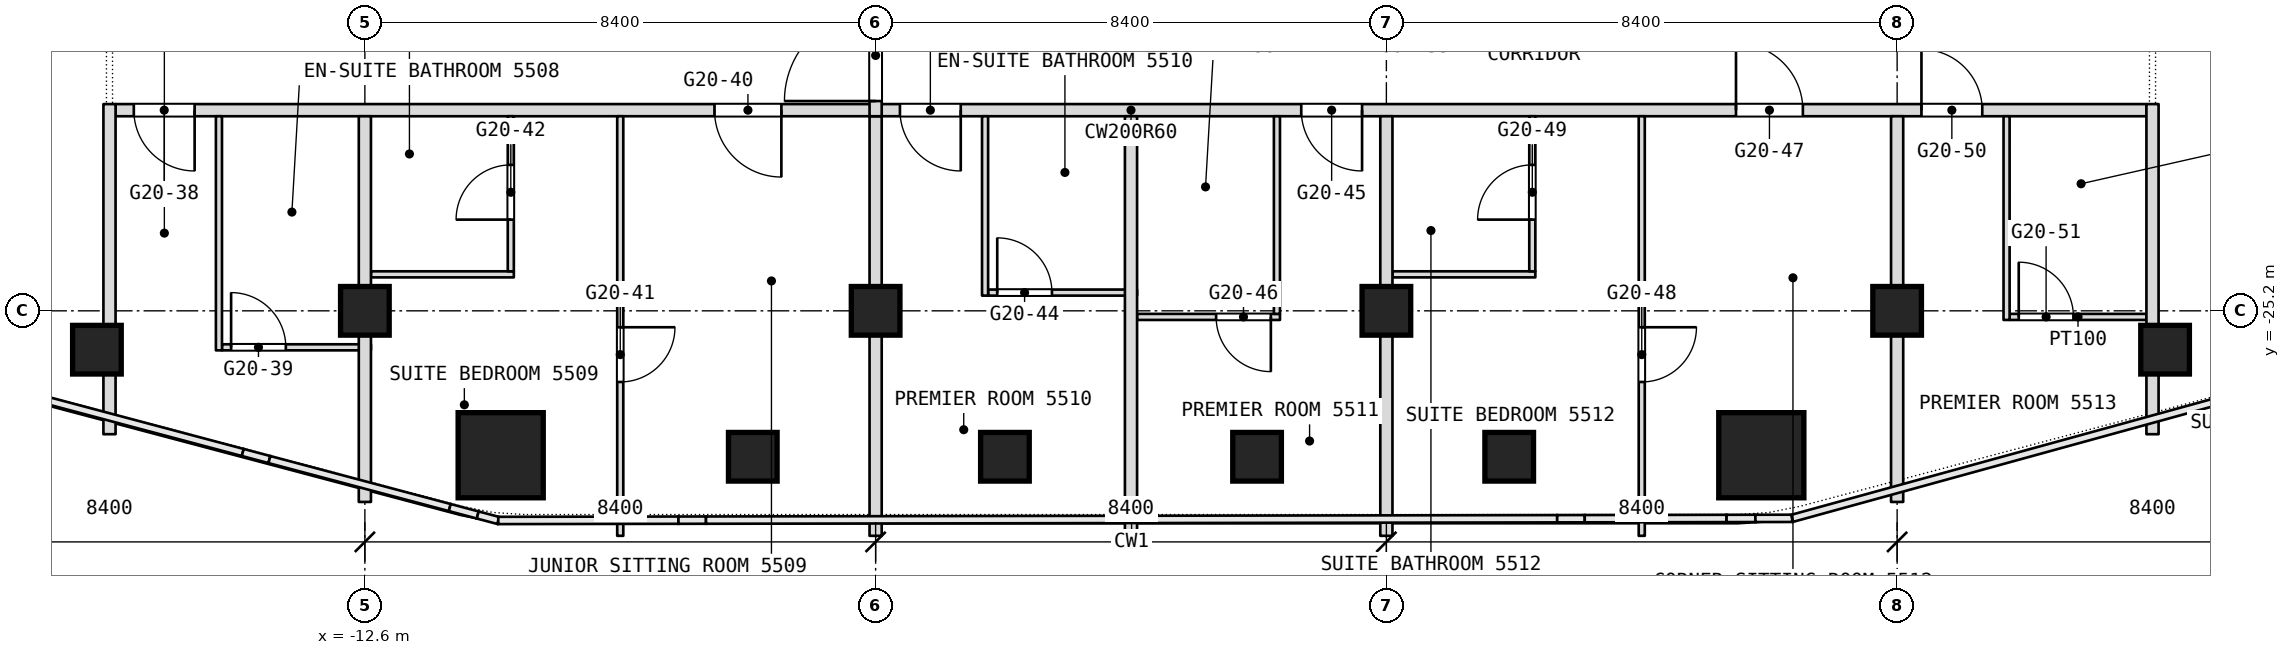
"""IFC4 building model, lengths in metres.
Left out: names, types, materials, properties, quantities, classifications, styles, units other than length and angle.
Written with IfcOpenShell. Run it as: python <this file> out.ifc"""

import sys

from ifc_helpers import new_model, si_unit, direction, frame, frame_2d, origin, origin_2d, place, context, subcontext, project, spatial, rectangle, extrude, element, fill, save


model = new_model("IFC4")
c1 = context("Model", 3, precision=1e-05, world=origin(), true_north=direction((0.0, 1.0)))
c2 = subcontext(c1, "Body", "Model", "MODEL_VIEW")
j1 = project(units=[si_unit("LENGTHUNIT", "METRE"), si_unit("PLANEANGLEUNIT", "RADIAN")], contexts=[c1])
p1 = place(None, origin())
s1 = spatial("IfcSite", under=j1, at=p1, CompositionType="ELEMENT")
p2 = place(p1, origin())
s2 = spatial("IfcBuilding", under=s1, at=p2, CompositionType="ELEMENT")
p3 = place(p2, frame((0.0, 0.0, 234.5)))
s3 = spatial("IfcBuildingStorey", under=s2, at=p3, CompositionType="ELEMENT", Elevation=234.5)
for number, where, z_axis, x_axis in (
    (1, (-10.366, -27.575, 0.0), (0.0, 0.0, 1.0), (1.0, 0.0, 0.0)),
    (2, (10.366, -27.575, 0.0), (0.0, 0.0, 1.0), (1.0, 0.0, 0.0)),
):
    element("IfcColumn", number, at=place(p3, frame(where, z_axis=z_axis, x_axis=x_axis)), inside=s3, PredefinedType="COLUMN", context=c2, shape_type="SweptSolid", body=[
        extrude(rectangle(XDim=1.4, YDim=1.4, at=origin_2d()), origin(), (0.0, 0.0, 1.0), 3.6),
    ])
for number, where, z_axis, x_axis in (
    (3, (-12.6, -25.2, 0.0), (0.0, 0.0, 1.0), (1.0, 0.0, 0.0)),
    (4, (-4.2, -25.2, 0.0), (0.0, 0.0, 1.0), (1.0, 0.0, 0.0)),
    (5, (4.2, -25.2, 0.0), (0.0, 0.0, 1.0), (1.0, 0.0, 0.0)),
    (6, (12.6, -25.2, 0.0), (0.0, 0.0, 1.0), (1.0, 0.0, 0.0)),
    (7, (17.007, -25.839, 0.0), (0.0, 0.0, 1.0), (1.0, 0.0, 0.0)),
    (8, (6.22, -27.6, 0.0), (0.0, 0.0, 1.0), (1.0, 0.0, 0.0)),
    (9, (2.073, -27.6, 0.0), (0.0, 0.0, 1.0), (1.0, 0.0, 0.0)),
    (10, (-2.073, -27.6, 0.0), (0.0, 0.0, 1.0), (1.0, 0.0, 0.0)),
    (11, (-6.22, -27.6, 0.0), (0.0, 0.0, 1.0), (1.0, 0.0, 0.0)),
    (12, (-17.007, -25.839, 0.0), (0.0, 0.0, 1.0), (1.0, 0.0, 0.0)),
):
    element("IfcColumn", number, at=place(p3, frame(where, z_axis=z_axis, x_axis=x_axis)), inside=s3, PredefinedType="COLUMN", context=c2, shape_type="SweptSolid", body=[
        extrude(rectangle(XDim=0.8, YDim=0.8, at=origin_2d()), origin(), (0.0, 0.0, 1.0), 3.6),
    ])
p4 = place(p3, frame((-14.95, -25.8, 0.0), z_axis=(0.0, 0.0, 1.0), x_axis=(1.0, 0.0, 0.0)))
e13 = element("IfcWall", 13, at=p4, inside=s3, PredefinedType="PARTITIONING", context=c2, shape_type="SweptSolid", body=[
    extrude(rectangle(XDim=2.45, YDim=0.1, at=frame_2d((1.225, 0.0))), origin(), (0.0, 0.0, 1.0), 3.34),
])
p5 = place(p4, frame((0.15, 0.0, 0.0)))
e14 = element("IfcOpeningElement", 14, at=p5, cuts=e13, PredefinedType="OPENING", context=c2, shape_type="SweptSolid", body=[
    extrude(rectangle(XDim=0.9, YDim=2.1, at=frame_2d((0.45, 1.05))), frame((0.0, 0.05, 0.0), z_axis=(0.0, -1.0, 0.0), x_axis=(1.0, 0.0, 0.0)), (0.0, 0.0, 1.0), 0.1),
])
p6 = place(p3, frame((0.1, -25.3, 0.0), z_axis=(0.0, 0.0, 1.0), x_axis=(1.0, 0.0, 0.0)))
e15 = element("IfcWall", 15, at=p6, inside=s3, PredefinedType="PARTITIONING", context=c2, shape_type="SweptSolid", body=[
    extrude(rectangle(XDim=2.35, YDim=0.1, at=frame_2d((1.175, 0.0))), origin(), (0.0, 0.0, 1.0), 2.94),
])
p7 = place(p6, frame((1.3, 0.0, 0.0)))
e16 = element("IfcOpeningElement", 16, at=p7, cuts=e15, PredefinedType="OPENING", context=c2, shape_type="SweptSolid", body=[
    extrude(rectangle(XDim=0.9, YDim=2.1, at=frame_2d((0.45, 1.05))), frame((0.0, 0.05, 0.0), z_axis=(0.0, -1.0, 0.0), x_axis=(1.0, 0.0, 0.0)), (0.0, 0.0, 1.0), 0.1),
])
p8 = place(p3, frame((14.45, -25.3, 0.0), z_axis=(0.0, 0.0, 1.0), x_axis=(1.0, 0.0, 0.0)))
e17 = element("IfcWall", 17, at=p8, inside=s3, PredefinedType="PARTITIONING", context=c2, shape_type="SweptSolid", body=[
    extrude(rectangle(XDim=2.25, YDim=0.1, at=frame_2d((1.125, 0.0))), origin(), (0.0, 0.0, 1.0), 2.94),
])
p9 = place(p8, frame((0.15, 0.0, 0.0)))
e18 = element("IfcOpeningElement", 18, at=p9, cuts=e17, PredefinedType="OPENING", context=c2, shape_type="SweptSolid", body=[
    extrude(rectangle(XDim=0.9, YDim=2.1, at=frame_2d((0.45, 1.05))), frame((0.0, 0.05, 0.0), z_axis=(0.0, -1.0, 0.0), x_axis=(1.0, 0.0, 0.0)), (0.0, 0.0, 1.0), 0.1),
])
p10 = place(p3, frame((-2.35, -24.9, 0.0), z_axis=(0.0, 0.0, 1.0), x_axis=(1.0, 0.0, 0.0)))
e19 = element("IfcWall", 19, at=p10, inside=s3, PredefinedType="PARTITIONING", context=c2, shape_type="SweptSolid", body=[
    extrude(rectangle(XDim=2.45, YDim=0.1, at=frame_2d((1.225, 0.0))), origin(), (0.0, 0.0, 1.0), 3.34),
])
p11 = place(p10, frame((0.15, 0.0, 0.0)))
e20 = element("IfcOpeningElement", 20, at=p11, cuts=e19, PredefinedType="OPENING", context=c2, shape_type="SweptSolid", body=[
    extrude(rectangle(XDim=0.9, YDim=2.1, at=frame_2d((0.45, 1.05))), frame((0.0, 0.05, 0.0), z_axis=(0.0, -1.0, 0.0), x_axis=(1.0, 0.0, 0.0)), (0.0, 0.0, 1.0), 0.1),
])
p12 = place(p3, frame((-12.5, -24.6, 0.0), z_axis=(0.0, 0.0, 1.0), x_axis=(1.0, 0.0, 0.0)))
e21 = element("IfcWall", 21, at=p12, inside=s3, PredefinedType="PARTITIONING", context=c2, shape_type="SweptSolid", body=[
    extrude(rectangle(XDim=2.35, YDim=0.1, at=frame_2d((1.175, 0.0))), origin(), (0.0, 0.0, 1.0), 3.34),
])
p13 = place(p3, frame((4.3, -24.6, 0.0), z_axis=(0.0, 0.0, 1.0), x_axis=(1.0, 0.0, 0.0)))
e22 = element("IfcWall", 22, at=p13, inside=s3, PredefinedType="PARTITIONING", context=c2, shape_type="SweptSolid", body=[
    extrude(rectangle(XDim=2.35, YDim=0.1, at=frame_2d((1.175, 0.0))), origin(), (0.0, 0.0, 1.0), 3.34),
])
p14 = place(p3, frame((-16.7, -21.9, 0.0), z_axis=(0.0, 0.0, 1.0), x_axis=(1.0, 0.0, 0.0)))
e23 = element("IfcWall", 23, at=p14, inside=s3, PredefinedType="PARTITIONING", context=c2, shape_type="SweptSolid", body=[
    extrude(rectangle(XDim=33.4, YDim=0.2, at=frame_2d((16.7, 0.0))), origin(), (0.0, 0.0, 1.0), 3.34),
])
p15 = place(p14, frame((0.3, 0.0, 0.0)))
e24 = element("IfcOpeningElement", 24, at=p15, cuts=e23, PredefinedType="OPENING", context=c2, shape_type="SweptSolid", body=[
    extrude(rectangle(XDim=1.0, YDim=2.1, at=frame_2d((0.5, 1.05))), frame((0.0, 0.1, 0.0), z_axis=(0.0, -1.0, 0.0), x_axis=(1.0, 0.0, 0.0)), (0.0, 0.0, 1.0), 0.2),
])
p16 = place(p14, frame((9.85, 0.0, 0.0)))
e25 = element("IfcOpeningElement", 25, at=p16, cuts=e23, PredefinedType="OPENING", context=c2, shape_type="SweptSolid", body=[
    extrude(rectangle(XDim=1.1, YDim=2.1, at=frame_2d((0.55, 1.05))), frame((0.0, 0.1, 0.0), z_axis=(0.0, -1.0, 0.0), x_axis=(1.0, 0.0, 0.0)), (0.0, 0.0, 1.0), 0.2),
])
p17 = place(p14, frame((12.9, 0.0, 0.0)))
e26 = element("IfcOpeningElement", 26, at=p17, cuts=e23, PredefinedType="OPENING", context=c2, shape_type="SweptSolid", body=[
    extrude(rectangle(XDim=1.0, YDim=2.1, at=frame_2d((0.5, 1.05))), frame((0.0, 0.1, 0.0), z_axis=(0.0, -1.0, 0.0), x_axis=(1.0, 0.0, 0.0)), (0.0, 0.0, 1.0), 0.2),
])
p18 = place(p14, frame((19.5, 0.0, 0.0)))
e27 = element("IfcOpeningElement", 27, at=p18, cuts=e23, PredefinedType="OPENING", context=c2, shape_type="SweptSolid", body=[
    extrude(rectangle(XDim=1.0, YDim=2.1, at=frame_2d((0.5, 1.05))), frame((0.0, 0.1, 0.0), z_axis=(0.0, -1.0, 0.0), x_axis=(1.0, 0.0, 0.0)), (0.0, 0.0, 1.0), 0.2),
])
p19 = place(p14, frame((26.65, 0.0, 0.0)))
e28 = element("IfcOpeningElement", 28, at=p19, cuts=e23, PredefinedType="OPENING", context=c2, shape_type="SweptSolid", body=[
    extrude(rectangle(XDim=1.1, YDim=2.1, at=frame_2d((0.55, 1.05))), frame((0.0, 0.1, 0.0), z_axis=(0.0, -1.0, 0.0), x_axis=(1.0, 0.0, 0.0)), (0.0, 0.0, 1.0), 0.2),
])
p20 = place(p14, frame((29.7, 0.0, 0.0)))
e29 = element("IfcOpeningElement", 29, at=p20, cuts=e23, PredefinedType="OPENING", context=c2, shape_type="SweptSolid", body=[
    extrude(rectangle(XDim=1.0, YDim=2.1, at=frame_2d((0.5, 1.05))), frame((0.0, 0.1, 0.0), z_axis=(0.0, -1.0, 0.0), x_axis=(1.0, 0.0, 0.0)), (0.0, 0.0, 1.0), 0.2),
])
p21 = place(p3, frame((16.8, -27.229, 0.0), z_axis=(0.0, 0.0, 1.0), x_axis=(0.0, 1.0, 0.0)))
e30 = element("IfcWall", 30, at=p21, inside=s3, PredefinedType="PARTITIONING", context=c2, shape_type="SweptSolid", body=[
    extrude(rectangle(XDim=5.429, YDim=0.2, at=frame_2d((2.714, 0.0))), origin(), (0.0, 0.0, 1.0), 3.34),
])
p22 = place(p3, frame((14.4, -25.35, 0.0), z_axis=(0.0, 0.0, 1.0), x_axis=(0.0, 1.0, 0.0)))
e31 = element("IfcWall", 31, at=p22, inside=s3, PredefinedType="PARTITIONING", context=c2, shape_type="SweptSolid", body=[
    extrude(rectangle(XDim=3.35, YDim=0.1, at=frame_2d((1.675, 0.0))), origin(), (0.0, 0.0, 1.0), 3.34),
])
p23 = place(p3, frame((12.6, -28.343, 0.0), z_axis=(0.0, 0.0, 1.0), x_axis=(0.0, 1.0, 0.0)))
e32 = element("IfcWall", 32, at=p23, inside=s3, PredefinedType="PARTITIONING", context=c2, shape_type="SweptSolid", body=[
    extrude(rectangle(XDim=6.343, YDim=0.2, at=frame_2d((3.171, 0.0))), origin(), (0.0, 0.0, 1.0), 3.34),
])
p24 = place(p3, frame((8.4, -28.9, 0.0), z_axis=(0.0, 0.0, 1.0), x_axis=(0.0, 1.0, 0.0)))
e33 = element("IfcWall", 33, at=p24, inside=s3, PredefinedType="PARTITIONING", context=c2, shape_type="SweptSolid", body=[
    extrude(rectangle(XDim=6.9, YDim=0.1, at=frame_2d((3.45, 0.0))), origin(), (0.0, 0.0, 1.0), 3.34),
])
p25 = place(p24, frame((2.53, 0.0, 0.0)))
e34 = element("IfcOpeningElement", 34, at=p25, cuts=e33, PredefinedType="OPENING", context=c2, shape_type="SweptSolid", body=[
    extrude(rectangle(XDim=0.9, YDim=2.1, at=frame_2d((0.45, 1.05))), frame((0.0, 0.05, 0.0), z_axis=(0.0, -1.0, 0.0), x_axis=(1.0, 0.0, 0.0)), (0.0, 0.0, 1.0), 0.1),
])
p26 = place(p3, frame((6.6, -24.55, 0.0), z_axis=(0.0, 0.0, 1.0), x_axis=(0.0, 1.0, 0.0)))
e35 = element("IfcWall", 35, at=p26, inside=s3, PredefinedType="PARTITIONING", context=c2, shape_type="SweptSolid", body=[
    extrude(rectangle(XDim=2.55, YDim=0.1, at=frame_2d((1.275, 0.0))), origin(), (0.0, 0.0, 1.0), 3.34),
])
p27 = place(p26, frame((0.85, 0.0, 0.0)))
e36 = element("IfcOpeningElement", 36, at=p27, cuts=e35, PredefinedType="OPENING", context=c2, shape_type="SweptSolid", body=[
    extrude(rectangle(XDim=0.9, YDim=2.1, at=frame_2d((0.45, 1.05))), frame((0.0, 0.05, 0.0), z_axis=(0.0, -1.0, 0.0), x_axis=(1.0, 0.0, 0.0)), (0.0, 0.0, 1.0), 0.1),
])
p28 = place(p3, frame((4.2, -28.9, 0.0), z_axis=(0.0, 0.0, 1.0), x_axis=(0.0, 1.0, 0.0)))
e37 = element("IfcWall", 37, at=p28, inside=s3, PredefinedType="PARTITIONING", context=c2, shape_type="SweptSolid", body=[
    extrude(rectangle(XDim=6.9, YDim=0.2, at=frame_2d((3.45, 0.0))), origin(), (0.0, 0.0, 1.0), 3.34),
])
p29 = place(p3, frame((2.4, -25.25, 0.0), z_axis=(0.0, 0.0, 1.0), x_axis=(0.0, 1.0, 0.0)))
e38 = element("IfcWall", 38, at=p29, inside=s3, PredefinedType="PARTITIONING", context=c2, shape_type="SweptSolid", body=[
    extrude(rectangle(XDim=3.25, YDim=0.1, at=frame_2d((1.625, 0.0))), origin(), (0.0, 0.0, 1.0), 3.34),
])
p30 = place(p3, frame((0.0, -28.9, 0.0), z_axis=(0.0, 0.0, 1.0), x_axis=(0.0, 1.0, 0.0)))
e39 = element("IfcWall", 39, at=p30, inside=s3, PredefinedType="PARTITIONING", context=c2, shape_type="SweptSolid", body=[
    extrude(rectangle(XDim=6.9, YDim=0.2, at=frame_2d((3.45, 0.0))), origin(), (0.0, 0.0, 1.0), 3.34),
])
p31 = place(p3, frame((-2.4, -24.95, 0.0), z_axis=(0.0, 0.0, 1.0), x_axis=(0.0, 1.0, 0.0)))
e40 = element("IfcWall", 40, at=p31, inside=s3, PredefinedType="PARTITIONING", context=c2, shape_type="SweptSolid", body=[
    extrude(rectangle(XDim=2.95, YDim=0.1, at=frame_2d((1.475, 0.0))), origin(), (0.0, 0.0, 1.0), 3.34),
])
p32 = place(p3, frame((-4.2, -28.9, 0.0), z_axis=(0.0, 0.0, 1.0), x_axis=(0.0, 1.0, 0.0)))
e41 = element("IfcWall", 41, at=p32, inside=s3, PredefinedType="PARTITIONING", context=c2, shape_type="SweptSolid", body=[
    extrude(rectangle(XDim=6.9, YDim=0.2, at=frame_2d((3.45, 0.0))), origin(), (0.0, 0.0, 1.0), 3.34),
])
p33 = place(p3, frame((-4.2, -22.0, 0.0), z_axis=(0.0, 0.0, 1.0), x_axis=(0.0, 1.0, 0.0)))
e42 = element("IfcWall", 42, at=p33, inside=s3, PredefinedType="PARTITIONING", context=c2, shape_type="SweptSolid", body=[
    extrude(rectangle(XDim=8.4, YDim=0.2, at=frame_2d((4.2, 0.0))), origin(), (0.0, 0.0, 1.0), 3.34),
])
p34 = place(p33, frame((0.25, 0.0, 0.0)))
e43 = element("IfcOpeningElement", 43, at=p34, cuts=e42, PredefinedType="OPENING", context=c2, shape_type="SweptSolid", body=[
    extrude(rectangle(XDim=1.5, YDim=2.1, at=frame_2d((0.75, 1.05))), frame((0.0, 0.1, 0.0), z_axis=(0.0, -1.0, 0.0), x_axis=(1.0, 0.0, 0.0)), (0.0, 0.0, 1.0), 0.2),
])
p35 = place(p3, frame((-8.4, -28.9, 0.0), z_axis=(0.0, 0.0, 1.0), x_axis=(0.0, 1.0, 0.0)))
e44 = element("IfcWall", 44, at=p35, inside=s3, PredefinedType="PARTITIONING", context=c2, shape_type="SweptSolid", body=[
    extrude(rectangle(XDim=6.9, YDim=0.1, at=frame_2d((3.45, 0.0))), origin(), (0.0, 0.0, 1.0), 3.34),
])
p36 = place(p35, frame((2.53, 0.0, 0.0)))
e45 = element("IfcOpeningElement", 45, at=p36, cuts=e44, PredefinedType="OPENING", context=c2, shape_type="SweptSolid", body=[
    extrude(rectangle(XDim=0.9, YDim=2.1, at=frame_2d((0.45, 1.05))), frame((0.0, 0.05, 0.0), z_axis=(0.0, -1.0, 0.0), x_axis=(1.0, 0.0, 0.0)), (0.0, 0.0, 1.0), 0.1),
])
p37 = place(p3, frame((-10.2, -24.55, 0.0), z_axis=(0.0, 0.0, 1.0), x_axis=(0.0, 1.0, 0.0)))
e46 = element("IfcWall", 46, at=p37, inside=s3, PredefinedType="PARTITIONING", context=c2, shape_type="SweptSolid", body=[
    extrude(rectangle(XDim=2.55, YDim=0.1, at=frame_2d((1.275, 0.0))), origin(), (0.0, 0.0, 1.0), 3.34),
])
p38 = place(p37, frame((0.85, 0.0, 0.0)))
e47 = element("IfcOpeningElement", 47, at=p38, cuts=e46, PredefinedType="OPENING", context=c2, shape_type="SweptSolid", body=[
    extrude(rectangle(XDim=0.9, YDim=2.1, at=frame_2d((0.45, 1.05))), frame((0.0, 0.05, 0.0), z_axis=(0.0, -1.0, 0.0), x_axis=(1.0, 0.0, 0.0)), (0.0, 0.0, 1.0), 0.1),
])
p39 = place(p3, frame((-12.6, -28.343, 0.0), z_axis=(0.0, 0.0, 1.0), x_axis=(0.0, 1.0, 0.0)))
e48 = element("IfcWall", 48, at=p39, inside=s3, PredefinedType="PARTITIONING", context=c2, shape_type="SweptSolid", body=[
    extrude(rectangle(XDim=6.343, YDim=0.2, at=frame_2d((3.171, 0.0))), origin(), (0.0, 0.0, 1.0), 3.34),
])
p40 = place(p3, frame((-15.0, -25.85, 0.0), z_axis=(0.0, 0.0, 1.0), x_axis=(0.0, 1.0, 0.0)))
e49 = element("IfcWall", 49, at=p40, inside=s3, PredefinedType="PARTITIONING", context=c2, shape_type="SweptSolid", body=[
    extrude(rectangle(XDim=3.85, YDim=0.1, at=frame_2d((1.925, 0.0))), origin(), (0.0, 0.0, 1.0), 3.34),
])
p41 = place(p3, frame((-16.8, -27.229, 0.0), z_axis=(0.0, 0.0, 1.0), x_axis=(0.0, 1.0, 0.0)))
e50 = element("IfcWall", 50, at=p41, inside=s3, PredefinedType="PARTITIONING", context=c2, shape_type="SweptSolid", body=[
    extrude(rectangle(XDim=5.429, YDim=0.2, at=frame_2d((2.714, 0.0))), origin(), (0.0, 0.0, 1.0), 3.34),
])
p42 = place(p5, origin())
e51 = element("IfcDoor", 51, at=p42, inside=s3, OperationType="SINGLE_SWING_LEFT", PredefinedType="DOOR", context=c2, shape_type="SweptSolid", body=[
    extrude(rectangle(XDim=0.9, YDim=2.1, at=frame_2d((0.45, 1.05))), frame((0.0, 0.025, 0.0), z_axis=(0.0, -1.0, 0.0), x_axis=(1.0, 0.0, 0.0)), (0.0, 0.0, 1.0), 0.05),
])
fill(e14, e51)
p43 = place(p7, origin())
e52 = element("IfcDoor", 52, at=p43, inside=s3, OperationType="SINGLE_SWING_RIGHT", PredefinedType="DOOR", context=c2, shape_type="SweptSolid", body=[
    extrude(rectangle(XDim=0.9, YDim=2.1, at=frame_2d((0.45, 1.05))), frame((0.0, 0.025, 0.0), z_axis=(0.0, -1.0, 0.0), x_axis=(1.0, 0.0, 0.0)), (0.0, 0.0, 1.0), 0.05),
])
fill(e16, e52)
p44 = place(p9, origin())
e53 = element("IfcDoor", 53, at=p44, inside=s3, OperationType="SINGLE_SWING_LEFT", PredefinedType="DOOR", context=c2, shape_type="SweptSolid", body=[
    extrude(rectangle(XDim=0.9, YDim=2.1, at=frame_2d((0.45, 1.05))), frame((0.0, 0.025, 0.0), z_axis=(0.0, -1.0, 0.0), x_axis=(1.0, 0.0, 0.0)), (0.0, 0.0, 1.0), 0.05),
])
fill(e18, e53)
p45 = place(p11, origin())
e54 = element("IfcDoor", 54, at=p45, inside=s3, OperationType="SINGLE_SWING_LEFT", PredefinedType="DOOR", context=c2, shape_type="SweptSolid", body=[
    extrude(rectangle(XDim=0.9, YDim=2.1, at=frame_2d((0.45, 1.05))), frame((0.0, 0.025, 0.0), z_axis=(0.0, -1.0, 0.0), x_axis=(1.0, 0.0, 0.0)), (0.0, 0.0, 1.0), 0.05),
])
fill(e20, e54)
p46 = place(p15, origin())
e55 = element("IfcDoor", 55, at=p46, inside=s3, OperationType="SINGLE_SWING_RIGHT", PredefinedType="DOOR", context=c2, shape_type="SweptSolid", body=[
    extrude(rectangle(XDim=1.0, YDim=2.1, at=frame_2d((0.5, 1.05))), frame((0.0, 0.025, 0.0), z_axis=(0.0, -1.0, 0.0), x_axis=(1.0, 0.0, 0.0)), (0.0, 0.0, 1.0), 0.05),
])
fill(e24, e55)
p47 = place(p16, origin())
e56 = element("IfcDoor", 56, at=p47, inside=s3, OperationType="SINGLE_SWING_RIGHT", PredefinedType="DOOR", context=c2, shape_type="SweptSolid", body=[
    extrude(rectangle(XDim=1.1, YDim=2.1, at=frame_2d((0.55, 1.05))), frame((0.0, 0.025, 0.0), z_axis=(0.0, -1.0, 0.0), x_axis=(1.0, 0.0, 0.0)), (0.0, 0.0, 1.0), 0.05),
])
fill(e25, e56)
p48 = place(p17, origin())
e57 = element("IfcDoor", 57, at=p48, inside=s3, OperationType="SINGLE_SWING_LEFT", PredefinedType="DOOR", context=c2, shape_type="SweptSolid", body=[
    extrude(rectangle(XDim=1.0, YDim=2.1, at=frame_2d((0.5, 1.05))), frame((0.0, 0.025, 0.0), z_axis=(0.0, -1.0, 0.0), x_axis=(1.0, 0.0, 0.0)), (0.0, 0.0, 1.0), 0.05),
])
fill(e26, e57)
p49 = place(p18, origin())
e58 = element("IfcDoor", 58, at=p49, inside=s3, OperationType="SINGLE_SWING_LEFT", PredefinedType="DOOR", context=c2, shape_type="SweptSolid", body=[
    extrude(rectangle(XDim=1.0, YDim=2.1, at=frame_2d((0.5, 1.05))), frame((0.0, 0.025, 0.0), z_axis=(0.0, -1.0, 0.0), x_axis=(1.0, 0.0, 0.0)), (0.0, 0.0, 1.0), 0.05),
])
fill(e27, e58)
p50 = place(p19, origin())
e59 = element("IfcDoor", 59, at=p50, inside=s3, OperationType="SINGLE_SWING_LEFT", PredefinedType="DOOR", context=c2, shape_type="SweptSolid", body=[
    extrude(rectangle(XDim=1.1, YDim=2.1, at=frame_2d((0.55, 1.05))), frame((0.0, 0.025, 0.0), z_axis=(0.0, -1.0, 0.0), x_axis=(1.0, 0.0, 0.0)), (0.0, 0.0, 1.0), 0.05),
])
fill(e28, e59)
p51 = place(p20, origin())
e60 = element("IfcDoor", 60, at=p51, inside=s3, OperationType="SINGLE_SWING_RIGHT", PredefinedType="DOOR", context=c2, shape_type="SweptSolid", body=[
    extrude(rectangle(XDim=1.0, YDim=2.1, at=frame_2d((0.5, 1.05))), frame((0.0, 0.025, 0.0), z_axis=(0.0, -1.0, 0.0), x_axis=(1.0, 0.0, 0.0)), (0.0, 0.0, 1.0), 0.05),
])
fill(e29, e60)
p52 = place(p25, origin())
e61 = element("IfcDoor", 61, at=p52, inside=s3, OperationType="SINGLE_SWING_LEFT", PredefinedType="DOOR", context=c2, shape_type="SweptSolid", body=[
    extrude(rectangle(XDim=0.9, YDim=2.1, at=frame_2d((0.45, 1.05))), frame((0.0, 0.025, 0.0), z_axis=(0.0, -1.0, 0.0), x_axis=(1.0, 0.0, 0.0)), (0.0, 0.0, 1.0), 0.05),
])
fill(e34, e61)
p53 = place(p27, origin())
e62 = element("IfcDoor", 62, at=p53, inside=s3, OperationType="SINGLE_SWING_RIGHT", PredefinedType="DOOR", context=c2, shape_type="SweptSolid", body=[
    extrude(rectangle(XDim=0.9, YDim=2.1, at=frame_2d((0.45, 1.05))), frame((0.0, 0.025, 0.0), z_axis=(0.0, -1.0, 0.0), x_axis=(1.0, 0.0, 0.0)), (0.0, 0.0, 1.0), 0.05),
])
fill(e36, e62)
p54 = place(p36, origin())
e63 = element("IfcDoor", 63, at=p54, inside=s3, OperationType="SINGLE_SWING_LEFT", PredefinedType="DOOR", context=c2, shape_type="SweptSolid", body=[
    extrude(rectangle(XDim=0.9, YDim=2.1, at=frame_2d((0.45, 1.05))), frame((0.0, 0.025, 0.0), z_axis=(0.0, -1.0, 0.0), x_axis=(1.0, 0.0, 0.0)), (0.0, 0.0, 1.0), 0.05),
])
fill(e45, e63)
p55 = place(p38, origin())
e64 = element("IfcDoor", 64, at=p55, inside=s3, OperationType="SINGLE_SWING_RIGHT", PredefinedType="DOOR", context=c2, shape_type="SweptSolid", body=[
    extrude(rectangle(XDim=0.9, YDim=2.1, at=frame_2d((0.45, 1.05))), frame((0.0, 0.025, 0.0), z_axis=(0.0, -1.0, 0.0), x_axis=(1.0, 0.0, 0.0)), (0.0, 0.0, 1.0), 0.05),
])
fill(e47, e64)
p56 = place(p34, origin())
e65 = element("IfcDoor", 65, at=p56, inside=s3, OperationType="DOUBLE_DOOR_DOUBLE_SWING", PredefinedType="DOOR", context=c2, shape_type="SweptSolid", body=[
    extrude(rectangle(XDim=1.5, YDim=2.1, at=frame_2d((0.75, 1.05))), frame((0.0, 0.025, 0.0), z_axis=(0.0, -1.0, 0.0), x_axis=(1.0, 0.0, 0.0)), (0.0, 0.0, 1.0), 0.05),
])
fill(e43, e65)
save(model, sys.argv[1])
